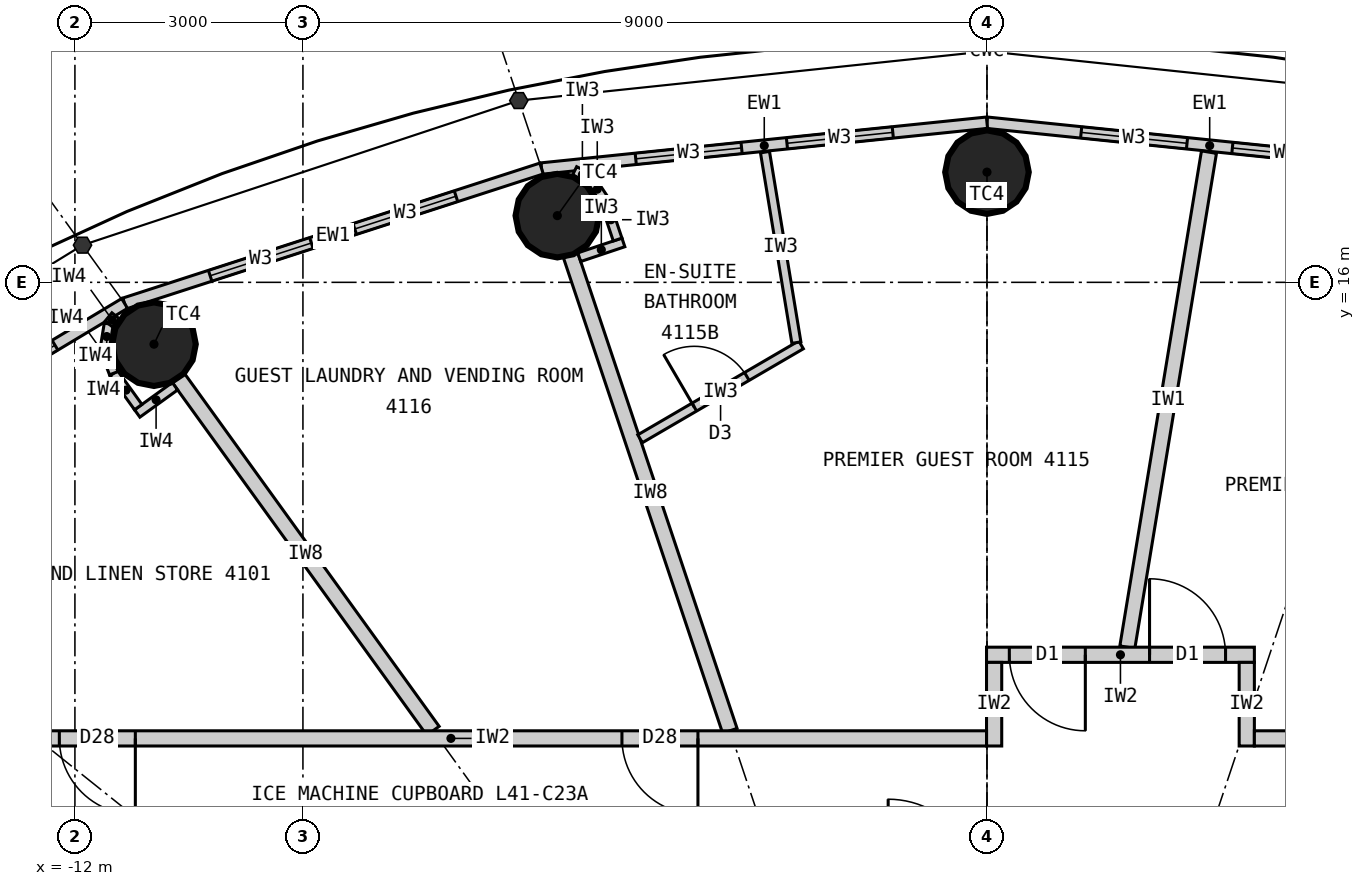
"""IFC4 building model, lengths in metres.
Left out: names, types, materials, properties, quantities, classifications, styles, units other than length and angle.
Written with IfcOpenShell. Run it as: python <this file> out.ifc"""

import sys

from ifc_helpers import new_model, si_unit, direction, frame, frame_2d, origin, origin_2d, place, context, subcontext, project, spatial, rectangle, circle, extrude, element, fill, save


model = new_model("IFC4")
c1 = context("Model", 3, precision=1e-05, world=origin(), true_north=direction((0.0, 1.0)))
c2 = subcontext(c1, "Body", "Model", "MODEL_VIEW")
j1 = project(units=[si_unit("LENGTHUNIT", "METRE"), si_unit("PLANEANGLEUNIT", "RADIAN")], contexts=[c1])
p1 = place(None, origin())
s1 = spatial("IfcSite", under=j1, at=p1, CompositionType="ELEMENT")
p2 = place(p1, origin())
s2 = spatial("IfcBuilding", under=s1, at=p2, CompositionType="ELEMENT")
p3 = place(p2, frame((0.0, 0.0, 156.6)))
s3 = spatial("IfcBuildingStorey", under=s2, at=p3, CompositionType="ELEMENT", Elevation=156.6)
for number, where, z_axis, x_axis in (
    (1, (0.0, 17.45, 0.0), (0.0, 0.0, 1.0), (1.0, 0.0, 0.0)),
    (2, (-5.653, 16.877, 0.0), (0.0, 0.0, 1.0), (1.0, 0.0, 0.0)),
    (3, (-10.96, 15.186, 0.0), (0.0, 0.0, 1.0), (1.0, 0.0, 0.0)),
):
    element("IfcColumn", number, at=place(p3, frame(where, z_axis=z_axis, x_axis=x_axis)), inside=s3, PredefinedType="COLUMN", context=c2, shape_type="SweptSolid", body=[
        extrude(circle(Radius=0.55, at=origin_2d()), origin(), (0.0, 0.0, 1.0), 3.3),
    ])
p4 = place(p3, frame((5.86, 17.497, 0.0), z_axis=(0.0, 0.0, 1.0), x_axis=(-0.994751738032, 0.102318032045, 0.0)))
e4 = element("IfcWall", 4, at=p4, inside=s3, PredefinedType="ELEMENTEDWALL", context=c2, shape_type="SweptSolid", body=[
    extrude(rectangle(XDim=5.891, YDim=0.15, at=frame_2d((2.946, 0.0))), origin(), (0.0, 0.0, 1.0), 3.12),
])
p5 = place(p4, frame((1.246, 0.0, 0.9)))
e5 = element("IfcOpeningElement", 5, at=p5, cuts=e4, PredefinedType="OPENING", context=c2, shape_type="SweptSolid", body=[
    extrude(rectangle(XDim=1.4, YDim=1.9, at=frame_2d((0.7, 0.95))), frame((0.0, 0.085, 0.0), z_axis=(0.0, -1.0, 0.0), x_axis=(1.0, 0.0, 0.0)), (0.0, 0.0, 1.0), 0.17),
])
p6 = place(p4, frame((3.246, 0.0, 0.9)))
e6 = element("IfcOpeningElement", 6, at=p6, cuts=e4, PredefinedType="OPENING", context=c2, shape_type="SweptSolid", body=[
    extrude(rectangle(XDim=1.4, YDim=1.9, at=frame_2d((0.7, 0.95))), frame((0.0, 0.085, 0.0), z_axis=(0.0, -1.0, 0.0), x_axis=(1.0, 0.0, 0.0)), (0.0, 0.0, 1.0), 0.17),
])
p7 = place(p3, frame((0.0, 18.1, 0.0), z_axis=(0.0, 0.0, 1.0), x_axis=(-0.994751738032, -0.102318032045, 0.0)))
e7 = element("IfcWall", 7, at=p7, inside=s3, PredefinedType="ELEMENTEDWALL", context=c2, shape_type="SweptSolid", body=[
    extrude(rectangle(XDim=5.891, YDim=0.15, at=frame_2d((2.946, 0.0))), origin(), (0.0, 0.0, 1.0), 3.12),
])
p8 = place(p7, frame((1.246, 0.0, 0.9)))
e8 = element("IfcOpeningElement", 8, at=p8, cuts=e7, PredefinedType="OPENING", context=c2, shape_type="SweptSolid", body=[
    extrude(rectangle(XDim=1.4, YDim=1.9, at=frame_2d((0.7, 0.95))), frame((0.0, 0.085, 0.0), z_axis=(0.0, -1.0, 0.0), x_axis=(1.0, 0.0, 0.0)), (0.0, 0.0, 1.0), 0.17),
])
p9 = place(p7, frame((3.246, 0.0, 0.9)))
e9 = element("IfcOpeningElement", 9, at=p9, cuts=e7, PredefinedType="OPENING", context=c2, shape_type="SweptSolid", body=[
    extrude(rectangle(XDim=1.4, YDim=1.9, at=frame_2d((0.7, 0.95))), frame((0.0, 0.085, 0.0), z_axis=(0.0, -1.0, 0.0), x_axis=(1.0, 0.0, 0.0)), (0.0, 0.0, 1.0), 0.17),
])
p10 = place(p3, frame((-5.86, 17.497, 0.0), z_axis=(0.0, 0.0, 1.0), x_axis=(-0.951432482129, -0.307857486429, 0.0)))
e10 = element("IfcWall", 10, at=p10, inside=s3, PredefinedType="ELEMENTEDWALL", context=c2, shape_type="SweptSolid", body=[
    extrude(rectangle(XDim=5.766, YDim=0.15, at=frame_2d((2.883, 0.0))), origin(), (0.0, 0.0, 1.0), 3.12),
])
p11 = place(p10, frame((1.183, 0.0, 0.9)))
e11 = element("IfcOpeningElement", 11, at=p11, cuts=e10, PredefinedType="OPENING", context=c2, shape_type="SweptSolid", body=[
    extrude(rectangle(XDim=1.4, YDim=1.9, at=frame_2d((0.7, 0.95))), frame((0.0, 0.085, 0.0), z_axis=(0.0, -1.0, 0.0), x_axis=(1.0, 0.0, 0.0)), (0.0, 0.0, 1.0), 0.17),
])
p12 = place(p10, frame((3.183, 0.0, 0.9)))
e12 = element("IfcOpeningElement", 12, at=p12, cuts=e10, PredefinedType="OPENING", context=c2, shape_type="SweptSolid", body=[
    extrude(rectangle(XDim=1.4, YDim=1.9, at=frame_2d((0.7, 0.95))), frame((0.0, 0.085, 0.0), z_axis=(0.0, -1.0, 0.0), x_axis=(1.0, 0.0, 0.0)), (0.0, 0.0, 1.0), 0.17),
])
p13 = place(p3, frame((-11.346, 15.722, 0.0), z_axis=(0.0, 0.0, 1.0), x_axis=(-0.857695199231, -0.514158482587, 0.0)))
e13 = element("IfcWall", 13, at=p13, inside=s3, PredefinedType="ELEMENTEDWALL", context=c2, shape_type="SweptSolid", body=[
    extrude(rectangle(XDim=5.536, YDim=0.15, at=frame_2d((2.768, 0.0))), origin(), (0.0, 0.0, 1.0), 3.12),
])
p14 = place(p13, frame((1.068, 0.0, 0.9)))
e14 = element("IfcOpeningElement", 14, at=p14, cuts=e13, PredefinedType="OPENING", context=c2, shape_type="SweptSolid", body=[
    extrude(rectangle(XDim=1.4, YDim=1.9, at=frame_2d((0.7, 0.95))), frame((0.0, 0.085, 0.0), z_axis=(0.0, -1.0, 0.0), x_axis=(1.0, 0.0, 0.0)), (0.0, 0.0, 1.0), 0.17),
])
p15 = place(p13, frame((3.068, 0.0, 0.9)))
e15 = element("IfcOpeningElement", 15, at=p15, cuts=e13, PredefinedType="OPENING", context=c2, shape_type="SweptSolid", body=[
    extrude(rectangle(XDim=1.4, YDim=1.9, at=frame_2d((0.7, 0.95))), frame((0.0, 0.085, 0.0), z_axis=(0.0, -1.0, 0.0), x_axis=(1.0, 0.0, 0.0)), (0.0, 0.0, 1.0), 0.17),
])
p16 = place(p3, frame((1.847, 11.2, 0.0), z_axis=(0.0, 0.0, 1.0), x_axis=(0.162695449404, 0.986676335352, 0.0)))
e16 = element("IfcWall", 16, at=p16, inside=s3, PredefinedType="PARTITIONING", context=c2, shape_type="SweptSolid", body=[
    extrude(rectangle(XDim=6.601, YDim=0.2, at=frame_2d((3.301, 0.0))), origin(), (0.0, 0.0, 1.0), 3.12),
])
p17 = place(p3, frame((-3.383, 10.1, 0.0), z_axis=(0.0, 0.0, 1.0), x_axis=(-0.317615120474, 0.948219718866, 0.0)))
e17 = element("IfcWall", 17, at=p17, inside=s3, PredefinedType="PARTITIONING", context=c2, shape_type="SweptSolid", body=[
    extrude(rectangle(XDim=6.597, YDim=0.2, at=frame_2d((3.299, 0.0))), origin(), (0.0, 0.0, 1.0), 2.42),
])
p18 = place(p3, frame((-7.289, 10.1, 0.0), z_axis=(0.0, 0.0, 1.0), x_axis=(-0.585222595178, 0.810872686735, 0.0)))
e18 = element("IfcWall", 18, at=p18, inside=s3, PredefinedType="PARTITIONING", context=c2, shape_type="SweptSolid", body=[
    extrude(rectangle(XDim=5.722, YDim=0.2, at=frame_2d((2.861, 0.0))), origin(), (0.0, 0.0, 1.0), 2.42),
])
p19 = place(p3, frame((-0.006, 11.1, 0.0), z_axis=(0.0, 0.0, 1.0), x_axis=(1.0, 0.0, 0.0)))
e19 = element("IfcWall", 19, at=p19, inside=s3, PredefinedType="PARTITIONING", context=c2, shape_type="SweptSolid", body=[
    extrude(rectangle(XDim=3.524, YDim=0.2, at=frame_2d((1.762, 0.0))), origin(), (0.0, 0.0, 1.0), 3.12),
])
p20 = place(p19, frame((2.145, 0.0, 0.0)))
e20 = element("IfcOpeningElement", 20, at=p20, cuts=e19, PredefinedType="OPENING", context=c2, shape_type="SweptSolid", body=[
    extrude(rectangle(XDim=1.0, YDim=2.2, at=frame_2d((0.5, 1.1))), frame((0.0, 0.11, 0.0), z_axis=(0.0, -1.0, 0.0), x_axis=(1.0, 0.0, 0.0)), (0.0, 0.0, 1.0), 0.22),
])
p21 = place(p19, frame((0.3, 0.0, 0.0)))
e21 = element("IfcOpeningElement", 21, at=p21, cuts=e19, PredefinedType="OPENING", context=c2, shape_type="SweptSolid", body=[
    extrude(rectangle(XDim=1.0, YDim=2.2, at=frame_2d((0.5, 1.1))), frame((0.0, 0.11, 0.0), z_axis=(0.0, -1.0, 0.0), x_axis=(1.0, 0.0, 0.0)), (0.0, 0.0, 1.0), 0.22),
])
p22 = place(p3, frame((0.094, 9.9, 0.0), z_axis=(0.0, 0.0, 1.0), x_axis=(0.0, 1.0, 0.0)))
e22 = element("IfcWall", 22, at=p22, inside=s3, PredefinedType="PARTITIONING", context=c2, shape_type="SweptSolid", body=[
    extrude(rectangle(XDim=1.1, YDim=0.2, at=frame_2d((0.55, 0.0))), origin(), (0.0, 0.0, 1.0), 2.42),
])
p23 = place(p3, frame((3.418, 9.9, 0.0), z_axis=(0.0, 0.0, 1.0), x_axis=(0.0, 1.0, 0.0)))
e23 = element("IfcWall", 23, at=p23, inside=s3, PredefinedType="PARTITIONING", context=c2, shape_type="SweptSolid", body=[
    extrude(rectangle(XDim=1.1, YDim=0.2, at=frame_2d((0.55, 0.0))), origin(), (0.0, 0.0, 1.0), 3.12),
])
p24 = place(p3, frame((-4.564, 13.942, 0.0), z_axis=(0.0, 0.0, 1.0), x_axis=(0.863717519451, 0.503976236139, 0.0)))
e24 = element("IfcWall", 24, at=p24, inside=s3, PredefinedType="PARTITIONING", context=c2, shape_type="SweptSolid", body=[
    extrude(rectangle(XDim=2.453, YDim=0.12, at=frame_2d((1.226, 0.0))), origin(), (0.0, 0.0, 1.0), 3.12),
])
p25 = place(p24, frame((0.826, 0.0, 0.0)))
e25 = element("IfcOpeningElement", 25, at=p25, cuts=e24, PredefinedType="OPENING", context=c2, shape_type="SweptSolid", body=[
    extrude(rectangle(XDim=0.8, YDim=2.1, at=frame_2d((0.4, 1.05))), frame((0.0, 0.07, 0.0), z_axis=(0.0, -1.0, 0.0), x_axis=(1.0, 0.0, 0.0)), (0.0, 0.0, 1.0), 0.14),
])
p26 = place(p3, frame((-2.508, 15.207, 0.0), z_axis=(0.0, 0.0, 1.0), x_axis=(-0.162637365963, 0.986685911115, 0.0)))
e26 = element("IfcWall", 26, at=p26, inside=s3, PredefinedType="PARTITIONING", context=c2, shape_type="SweptSolid", body=[
    extrude(rectangle(XDim=2.54, YDim=0.12, at=frame_2d((1.27, 0.0))), origin(), (0.0, 0.0, 1.0), 3.12),
])
p27 = place(p3, frame((-5.364, 16.331, 0.0), z_axis=(0.0, 0.0, 1.0), x_axis=(0.948283770087, 0.317423835572, 0.0)))
e27 = element("IfcWall", 27, at=p27, inside=s3, PredefinedType="PARTITIONING", context=c2, shape_type="SweptSolid", body=[
    extrude(rectangle(XDim=0.612, YDim=0.12, at=frame_2d((0.306, 0.0))), origin(), (0.0, 0.0, 1.0), 3.12),
])
p28 = place(p3, frame((-4.86, 16.563, 0.0), z_axis=(0.0, 0.0, 1.0), x_axis=(-0.317825321803, 0.948149284038, 0.0)))
e28 = element("IfcWall", 28, at=p28, inside=s3, PredefinedType="PARTITIONING", context=c2, shape_type="SweptSolid", body=[
    extrude(rectangle(XDim=0.55, YDim=0.12, at=frame_2d((0.275, 0.0))), origin(), (0.0, 0.0, 1.0), 3.12),
])
p29 = place(p3, frame((-5.034, 17.084, 0.0), z_axis=(0.0, 0.0, 1.0), x_axis=(-0.552362205726, 0.833604218851, 0.0)))
e29 = element("IfcWall", 29, at=p29, inside=s3, PredefinedType="PARTITIONING", context=c2, shape_type="SweptSolid", body=[
    extrude(rectangle(XDim=0.338, YDim=0.12, at=frame_2d((0.169, 0.0))), origin(), (0.0, 0.0, 1.0), 3.12),
])
p30 = place(p3, frame((-5.221, 17.366, 0.0), z_axis=(0.0, 0.0, 1.0), x_axis=(-0.895067896179, 0.445929883759, 0.0)))
e30 = element("IfcWall", 30, at=p30, inside=s3, PredefinedType="PARTITIONING", context=c2, shape_type="SweptSolid", body=[
    extrude(rectangle(XDim=0.228, YDim=0.12, at=frame_2d((0.114, 0.0))), origin(), (0.0, 0.0, 1.0), 3.12),
])
p31 = place(p3, frame((-14.1, 10.0, 0.0), z_axis=(0.0, 0.0, 1.0), x_axis=(1.0, 0.0, 0.0)))
e31 = element("IfcWall", 31, at=p31, inside=s3, PredefinedType="PARTITIONING", context=c2, shape_type="SweptSolid", body=[
    extrude(rectangle(XDim=14.094, YDim=0.2, at=frame_2d((7.047, 0.0))), origin(), (0.0, 0.0, 1.0), 3.12),
])
p32 = place(p31, frame((1.895, 0.0, 0.0)))
e32 = element("IfcOpeningElement", 32, at=p32, cuts=e31, PredefinedType="OPENING", context=c2, shape_type="SweptSolid", body=[
    extrude(rectangle(XDim=1.0, YDim=2.2, at=frame_2d((0.5, 1.1))), frame((0.0, 0.11, 0.0), z_axis=(0.0, -1.0, 0.0), x_axis=(1.0, 0.0, 0.0)), (0.0, 0.0, 1.0), 0.22),
])
p33 = place(p31, frame((9.297, 0.0, 0.0)))
e33 = element("IfcOpeningElement", 33, at=p33, cuts=e31, PredefinedType="OPENING", context=c2, shape_type="SweptSolid", body=[
    extrude(rectangle(XDim=1.0, YDim=2.2, at=frame_2d((0.5, 1.1))), frame((0.0, 0.11, 0.0), z_axis=(0.0, -1.0, 0.0), x_axis=(1.0, 0.0, 0.0)), (0.0, 0.0, 1.0), 0.22),
])
p34 = place(p3, frame((3.518, 10.0, 0.0), z_axis=(0.0, 0.0, 1.0), x_axis=(1.0, 0.0, 0.0)))
e34 = element("IfcWall", 34, at=p34, inside=s3, PredefinedType="PARTITIONING", context=c2, shape_type="SweptSolid", body=[
    extrude(rectangle(XDim=10.582, YDim=0.2, at=frame_2d((5.291, 0.0))), origin(), (0.0, 0.0, 1.0), 3.12),
])
p35 = place(p34, frame((4.621, 0.0, 0.0)))
e35 = element("IfcOpeningElement", 35, at=p35, cuts=e34, PredefinedType="OPENING", context=c2, shape_type="SweptSolid", body=[
    extrude(rectangle(XDim=1.0, YDim=2.2, at=frame_2d((0.5, 1.1))), frame((0.0, 0.11, 0.0), z_axis=(0.0, -1.0, 0.0), x_axis=(1.0, 0.0, 0.0)), (0.0, 0.0, 1.0), 0.22),
])
p36 = place(p3, frame((-10.684, 14.633, 0.0), z_axis=(0.0, 0.0, 1.0), x_axis=(-0.810921075692, -0.585155542568, 0.0)))
e36 = element("IfcWall", 36, at=p36, inside=s3, PredefinedType="PARTITIONING", context=c2, shape_type="SweptSolid", body=[
    extrude(rectangle(XDim=0.612, YDim=0.12, at=frame_2d((0.306, 0.0))), origin(), (0.0, 0.0, 1.0), 3.12),
])
p37 = place(p3, frame((-11.167, 14.359, 0.0), z_axis=(0.0, 0.0, 1.0), x_axis=(-0.585263549799, 0.810843127415, 0.0)))
e37 = element("IfcWall", 37, at=p37, inside=s3, PredefinedType="PARTITIONING", context=c2, shape_type="SweptSolid", body=[
    extrude(rectangle(XDim=0.55, YDim=0.12, at=frame_2d((0.275, 0.0))), origin(), (0.0, 0.0, 1.0), 3.12),
])
for number, where, z_axis, x_axis in (
    (38, (-11.489, 14.804, 0.0), (0.0, 0.0, 1.0), (-0.356, 0.935, 0.0)),
    (39, (-11.609, 15.12, 0.0), (0.0, 0.0, 1.0), (0.16, 0.987, 0.0)),
):
    element("IfcWall", number, at=place(p3, frame(where, z_axis=z_axis, x_axis=x_axis)), inside=s3, PredefinedType="PARTITIONING", context=c2, shape_type="SweptSolid", body=[
        extrude(rectangle(XDim=0.338, YDim=0.12, at=frame_2d((0.169, 0.0))), origin(), (0.0, 0.0, 1.0), 3.12),
    ])
p38 = place(p3, frame((-11.555, 15.453, 0.0), z_axis=(0.0, 0.0, 1.0), x_axis=(0.631711901025, 0.775203246964, 0.0)))
e40 = element("IfcWall", 40, at=p38, inside=s3, PredefinedType="PARTITIONING", context=c2, shape_type="SweptSolid", body=[
    extrude(rectangle(XDim=0.139, YDim=0.12, at=frame_2d((0.07, 0.0))), origin(), (0.0, 0.0, 1.0), 3.12),
])
p39 = place(p5, origin())
e41 = element("IfcWindow", 41, at=p39, inside=s3, PartitioningType="SINGLE_PANEL", PredefinedType="WINDOW", context=c2, shape_type="SweptSolid", body=[
    extrude(rectangle(XDim=1.4, YDim=1.9, at=frame_2d((0.7, 0.95))), frame((0.0, 0.03, 0.0), z_axis=(0.0, -1.0, 0.0), x_axis=(1.0, 0.0, 0.0)), (0.0, 0.0, 1.0), 0.06),
])
fill(e5, e41)
p40 = place(p6, origin())
e42 = element("IfcWindow", 42, at=p40, inside=s3, PartitioningType="SINGLE_PANEL", PredefinedType="WINDOW", context=c2, shape_type="SweptSolid", body=[
    extrude(rectangle(XDim=1.4, YDim=1.9, at=frame_2d((0.7, 0.95))), frame((0.0, 0.03, 0.0), z_axis=(0.0, -1.0, 0.0), x_axis=(1.0, 0.0, 0.0)), (0.0, 0.0, 1.0), 0.06),
])
fill(e6, e42)
p41 = place(p8, origin())
e43 = element("IfcWindow", 43, at=p41, inside=s3, PartitioningType="SINGLE_PANEL", PredefinedType="WINDOW", context=c2, shape_type="SweptSolid", body=[
    extrude(rectangle(XDim=1.4, YDim=1.9, at=frame_2d((0.7, 0.95))), frame((0.0, 0.03, 0.0), z_axis=(0.0, -1.0, 0.0), x_axis=(1.0, 0.0, 0.0)), (0.0, 0.0, 1.0), 0.06),
])
fill(e8, e43)
p42 = place(p9, origin())
e44 = element("IfcWindow", 44, at=p42, inside=s3, PartitioningType="SINGLE_PANEL", PredefinedType="WINDOW", context=c2, shape_type="SweptSolid", body=[
    extrude(rectangle(XDim=1.4, YDim=1.9, at=frame_2d((0.7, 0.95))), frame((0.0, 0.03, 0.0), z_axis=(0.0, -1.0, 0.0), x_axis=(1.0, 0.0, 0.0)), (0.0, 0.0, 1.0), 0.06),
])
fill(e9, e44)
p43 = place(p11, origin())
e45 = element("IfcWindow", 45, at=p43, inside=s3, PartitioningType="SINGLE_PANEL", PredefinedType="WINDOW", context=c2, shape_type="SweptSolid", body=[
    extrude(rectangle(XDim=1.4, YDim=1.9, at=frame_2d((0.7, 0.95))), frame((0.0, 0.03, 0.0), z_axis=(0.0, -1.0, 0.0), x_axis=(1.0, 0.0, 0.0)), (0.0, 0.0, 1.0), 0.06),
])
fill(e11, e45)
p44 = place(p12, origin())
e46 = element("IfcWindow", 46, at=p44, inside=s3, PartitioningType="SINGLE_PANEL", PredefinedType="WINDOW", context=c2, shape_type="SweptSolid", body=[
    extrude(rectangle(XDim=1.4, YDim=1.9, at=frame_2d((0.7, 0.95))), frame((0.0, 0.03, 0.0), z_axis=(0.0, -1.0, 0.0), x_axis=(1.0, 0.0, 0.0)), (0.0, 0.0, 1.0), 0.06),
])
fill(e12, e46)
p45 = place(p14, origin())
e47 = element("IfcWindow", 47, at=p45, inside=s3, PartitioningType="SINGLE_PANEL", PredefinedType="WINDOW", context=c2, shape_type="SweptSolid", body=[
    extrude(rectangle(XDim=1.4, YDim=1.9, at=frame_2d((0.7, 0.95))), frame((0.0, 0.03, 0.0), z_axis=(0.0, -1.0, 0.0), x_axis=(1.0, 0.0, 0.0)), (0.0, 0.0, 1.0), 0.06),
])
fill(e14, e47)
p46 = place(p32, origin())
e48 = element("IfcDoor", 48, at=p46, inside=s3, OperationType="SINGLE_SWING_RIGHT", PredefinedType="DOOR", context=c2, shape_type="SweptSolid", body=[
    extrude(rectangle(XDim=1.0, YDim=2.2, at=frame_2d((0.5, 1.1))), frame((0.0, 0.025, 0.0), z_axis=(0.0, -1.0, 0.0), x_axis=(1.0, 0.0, 0.0)), (0.0, 0.0, 1.0), 0.05),
])
fill(e32, e48)
p47 = place(p20, origin())
e49 = element("IfcDoor", 49, at=p47, inside=s3, OperationType="SINGLE_SWING_LEFT", PredefinedType="DOOR", context=c2, shape_type="SweptSolid", body=[
    extrude(rectangle(XDim=1.0, YDim=2.2, at=frame_2d((0.5, 1.1))), frame((0.0, 0.025, 0.0), z_axis=(0.0, -1.0, 0.0), x_axis=(1.0, 0.0, 0.0)), (0.0, 0.0, 1.0), 0.05),
])
fill(e20, e49)
p48 = place(p25, origin())
e50 = element("IfcDoor", 50, at=p48, inside=s3, OperationType="SINGLE_SWING_LEFT", PredefinedType="DOOR", context=c2, shape_type="SweptSolid", body=[
    extrude(rectangle(XDim=0.8, YDim=2.1, at=frame_2d((0.4, 1.05))), frame((0.0, 0.025, 0.0), z_axis=(0.0, -1.0, 0.0), x_axis=(1.0, 0.0, 0.0)), (0.0, 0.0, 1.0), 0.05),
])
fill(e25, e50)
p49 = place(p21, origin())
e51 = element("IfcDoor", 51, at=p49, inside=s3, OperationType="SINGLE_SWING_RIGHT", PredefinedType="DOOR", context=c2, shape_type="SweptSolid", body=[
    extrude(rectangle(XDim=1.0, YDim=2.2, at=frame_2d((0.5, 1.1))), frame((0.0, 0.025, 0.0), z_axis=(0.0, -1.0, 0.0), x_axis=(1.0, 0.0, 0.0)), (0.0, 0.0, 1.0), 0.05),
])
fill(e21, e51)
p50 = place(p33, origin())
e52 = element("IfcDoor", 52, at=p50, inside=s3, OperationType="SINGLE_SWING_RIGHT", PredefinedType="DOOR", context=c2, shape_type="SweptSolid", body=[
    extrude(rectangle(XDim=1.0, YDim=2.2, at=frame_2d((0.5, 1.1))), frame((0.0, 0.025, 0.0), z_axis=(0.0, -1.0, 0.0), x_axis=(1.0, 0.0, 0.0)), (0.0, 0.0, 1.0), 0.05),
])
fill(e33, e52)
save(model, sys.argv[1])
